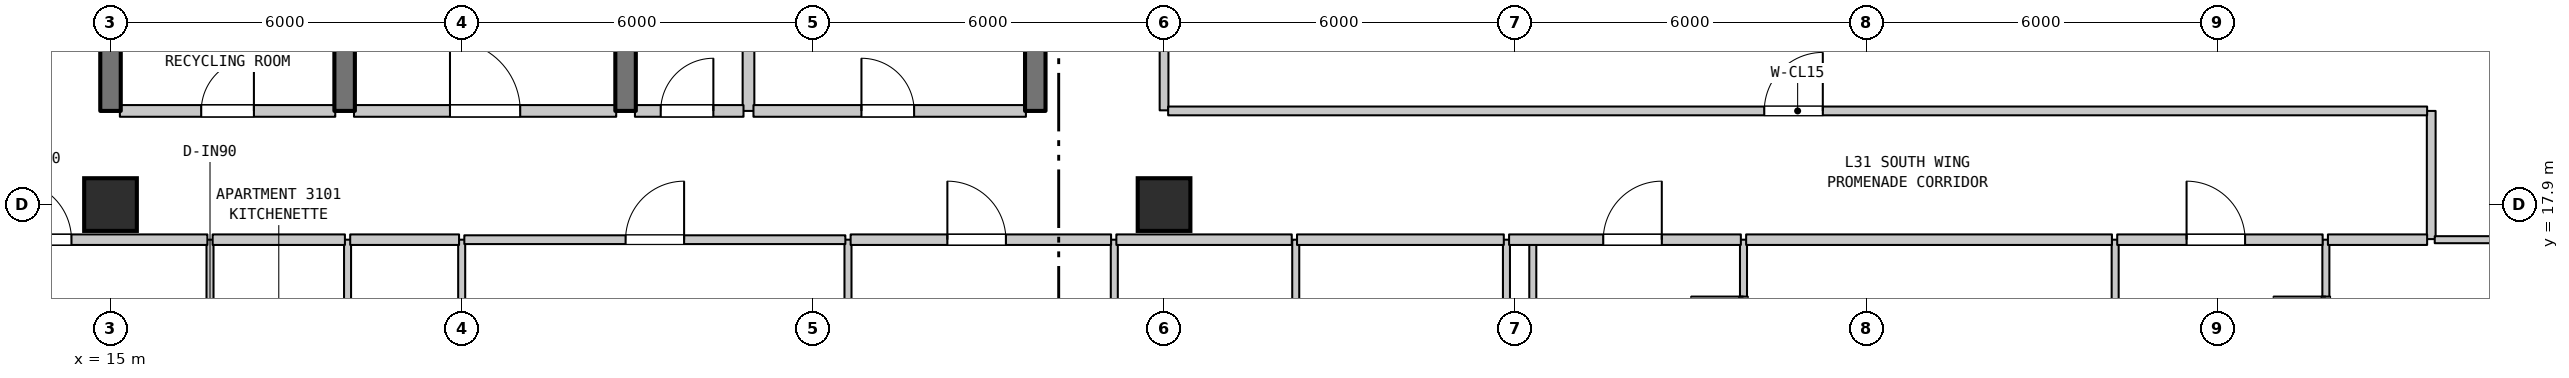
"""IFC4 building model, lengths in metres.
Left out: names, types, materials, properties, quantities, classifications, styles, units other than length and angle.
Written with IfcOpenShell. Run it as: python <this file> out.ifc"""

import sys

from ifc_helpers import new_model, si_unit, direction, frame, frame_2d, origin, origin_2d, place, context, subcontext, project, spatial, rectangle, extrude, element, fill, save


model = new_model("IFC4")
c1 = context("Model", 3, precision=1e-05, world=origin(), true_north=direction((0.0, 1.0)))
c2 = subcontext(c1, "Body", "Model", "MODEL_VIEW")
j1 = project(units=[si_unit("LENGTHUNIT", "METRE"), si_unit("PLANEANGLEUNIT", "RADIAN")], contexts=[c1])
p1 = place(None, origin())
s1 = spatial("IfcSite", under=j1, at=p1, CompositionType="ELEMENT")
p2 = place(p1, origin())
s2 = spatial("IfcBuilding", under=s1, at=p2, CompositionType="ELEMENT")
p3 = place(p2, frame((0.0, 0.0, 129.8)))
s3 = spatial("IfcBuildingStorey", under=s2, at=p3, CompositionType="ELEMENT", Elevation=129.8)
for number, where, z_axis, x_axis in (
    (1, (15.0, 17.9, 0.0), (0.0, 0.0, 1.0), (1.0, 0.0, 0.0)),
    (2, (33.0, 17.9, 0.0), (0.0, 0.0, 1.0), (1.0, 0.0, 0.0)),
):
    element("IfcColumn", number, at=place(p3, frame(where, z_axis=z_axis, x_axis=x_axis)), inside=s3, PredefinedType="COLUMN", context=c2, shape_type="SweptSolid", body=[
        extrude(rectangle(XDim=0.9, YDim=0.9, at=origin_2d()), origin(), (0.0, 0.0, 1.0), 3.7),
    ])
p4 = place(p3, frame((15.0, 19.5, 0.0), z_axis=(0.0, 0.0, 1.0), x_axis=(0.0, 1.0, 0.0)))
e3 = element("IfcWall", 3, at=p4, inside=s3, PredefinedType="SHEAR", context=c2, shape_type="SweptSolid", body=[
    extrude(rectangle(XDim=3.2, YDim=0.35, at=frame_2d((1.6, 0.0))), origin(), (0.0, 0.0, 1.0), 3.385),
])
p5 = place(p3, frame((16.7, 14.1, 0.0), z_axis=(0.0, 0.0, 1.0), x_axis=(0.0, 1.0, 0.0)))
e4 = element("IfcWall", 4, at=p5, inside=s3, PredefinedType="PARTITIONING", context=c2, shape_type="SweptSolid", body=[
    extrude(rectangle(XDim=3.2, YDim=0.12, at=frame_2d((1.6, 0.0))), origin(), (0.0, 0.0, 1.0), 3.385),
])
p6 = place(p5, frame((1.15, 0.0, 0.0)))
e5 = element("IfcOpeningElement", 5, at=p6, cuts=e4, PredefinedType="OPENING", context=c2, shape_type="SweptSolid", body=[
    extrude(rectangle(XDim=0.9, YDim=2.15, at=frame_2d((0.45, 1.075))), frame((0.0, 0.07, 0.0), z_axis=(0.0, -1.0, 0.0), x_axis=(1.0, 0.0, 0.0)), (0.0, 0.0, 1.0), 0.14),
])
p7 = place(p3, frame((19.0, 19.5, 0.0), z_axis=(0.0, 0.0, 1.0), x_axis=(0.0, 1.0, 0.0)))
e6 = element("IfcWall", 6, at=p7, inside=s3, PredefinedType="SHEAR", context=c2, shape_type="SweptSolid", body=[
    extrude(rectangle(XDim=3.2, YDim=0.35, at=frame_2d((1.6, 0.0))), origin(), (0.0, 0.0, 1.0), 3.385),
])
p8 = place(p3, frame((19.05, 14.1, 0.0), z_axis=(0.0, 0.0, 1.0), x_axis=(0.0, 1.0, 0.0)))
e7 = element("IfcWall", 7, at=p8, inside=s3, PredefinedType="PARTITIONING", context=c2, shape_type="SweptSolid", body=[
    extrude(rectangle(XDim=3.2, YDim=0.12, at=frame_2d((1.6, 0.0))), origin(), (0.0, 0.0, 1.0), 3.385),
])
p9 = place(p3, frame((21.0, 6.71, 0.0), z_axis=(0.0, 0.0, 1.0), x_axis=(0.0, 1.0, 0.0)))
e8 = element("IfcWall", 8, at=p9, inside=s3, PredefinedType="PARTITIONING", context=c2, shape_type="SweptSolid", body=[
    extrude(rectangle(XDim=10.59, YDim=0.12, at=frame_2d((5.295, 0.0))), origin(), (0.0, 0.0, 1.0), 3.385),
])
p10 = place(p3, frame((23.8, 19.5, 0.0), z_axis=(0.0, 0.0, 1.0), x_axis=(0.0, 1.0, 0.0)))
e9 = element("IfcWall", 9, at=p10, inside=s3, PredefinedType="SHEAR", context=c2, shape_type="SweptSolid", body=[
    extrude(rectangle(XDim=3.2, YDim=0.35, at=frame_2d((1.6, 0.0))), origin(), (0.0, 0.0, 1.0), 3.385),
])
p11 = place(p3, frame((25.9, 19.5, 0.0), z_axis=(0.0, 0.0, 1.0), x_axis=(0.0, 1.0, 0.0)))
e10 = element("IfcWall", 10, at=p11, inside=s3, PredefinedType="STANDARD", context=c2, shape_type="SweptSolid", body=[
    extrude(rectangle(XDim=3.2, YDim=0.2, at=frame_2d((1.6, 0.0))), origin(), (0.0, 0.0, 1.0), 3.385),
])
p12 = place(p3, frame((27.6, 0.71, 0.0), z_axis=(0.0, 0.0, 1.0), x_axis=(0.0, 1.0, 0.0)))
e11 = element("IfcWall", 11, at=p12, inside=s3, PredefinedType="PARTITIONING", context=c2, shape_type="SweptSolid", body=[
    extrude(rectangle(XDim=16.59, YDim=0.12, at=frame_2d((8.295, 0.0))), origin(), (0.0, 0.0, 1.0), 3.385),
])
p13 = place(p3, frame((30.8, 19.5, 0.0), z_axis=(0.0, 0.0, 1.0), x_axis=(0.0, 1.0, 0.0)))
e12 = element("IfcWall", 12, at=p13, inside=s3, PredefinedType="SHEAR", context=c2, shape_type="SweptSolid", body=[
    extrude(rectangle(XDim=3.2, YDim=0.35, at=frame_2d((1.6, 0.0))), origin(), (0.0, 0.0, 1.0), 3.385),
])
p14 = place(p3, frame((32.15, 11.15, 0.0), z_axis=(0.0, 0.0, 1.0), x_axis=(0.0, 1.0, 0.0)))
e13 = element("IfcWall", 13, at=p14, inside=s3, PredefinedType="PARTITIONING", context=c2, shape_type="SweptSolid", body=[
    extrude(rectangle(XDim=6.15, YDim=0.12, at=frame_2d((3.075, 0.0))), origin(), (0.0, 0.0, 1.0), 3.385),
])
p15 = place(p3, frame((33.0, 19.51, 0.0), z_axis=(0.0, 0.0, 1.0), x_axis=(0.0, 1.0, 0.0)))
e14 = element("IfcWall", 14, at=p15, inside=s3, PredefinedType="STANDARD", context=c2, shape_type="SweptSolid", body=[
    extrude(rectangle(XDim=5.35, YDim=0.15, at=frame_2d((2.675, 0.0))), origin(), (0.0, 0.0, 1.0), 2.935),
])
p16 = place(p15, frame((1.534, 0.0, 0.0)))
e15 = element("IfcOpeningElement", 15, at=p16, cuts=e14, PredefinedType="OPENING", context=c2, shape_type="SweptSolid", body=[
    extrude(rectangle(XDim=1.0, YDim=2.15, at=frame_2d((0.5, 1.075))), frame((0.0, 0.085, 0.0), z_axis=(0.0, -1.0, 0.0), x_axis=(1.0, 0.0, 0.0)), (0.0, 0.0, 1.0), 0.17),
])
for number, where, z_axis, x_axis in (
    (16, (35.25, 11.15, 0.0), (0.0, 0.0, 1.0), (0.0, 1.0, 0.0)),
    (17, (38.85, 11.15, 0.0), (0.0, 0.0, 1.0), (0.0, 1.0, 0.0)),
):
    element("IfcWall", number, at=place(p3, frame(where, z_axis=z_axis, x_axis=x_axis)), inside=s3, PredefinedType="PARTITIONING", context=c2, shape_type="SweptSolid", body=[
        extrude(rectangle(XDim=6.15, YDim=0.12, at=frame_2d((3.075, 0.0))), origin(), (0.0, 0.0, 1.0), 3.385),
    ])
p17 = place(p3, frame((39.3, 0.71, 0.0), z_axis=(0.0, 0.0, 1.0), x_axis=(0.0, 1.0, 0.0)))
e18 = element("IfcWall", 18, at=p17, inside=s3, PredefinedType="PARTITIONING", context=c2, shape_type="SweptSolid", body=[
    extrude(rectangle(XDim=16.59, YDim=0.12, at=frame_2d((8.295, 0.0))), origin(), (0.0, 0.0, 1.0), 3.385),
])
p18 = place(p3, frame((42.9, 14.6, 0.0), z_axis=(0.0, 0.0, 1.0), x_axis=(0.0, 1.0, 0.0)))
e19 = element("IfcWall", 19, at=p18, inside=s3, PredefinedType="PARTITIONING", context=c2, shape_type="SweptSolid", body=[
    extrude(rectangle(XDim=2.7, YDim=0.12, at=frame_2d((1.35, 0.0))), origin(), (0.0, 0.0, 1.0), 3.385),
])
p19 = place(p18, frame((0.828, 0.0, 0.0)))
e20 = element("IfcOpeningElement", 20, at=p19, cuts=e19, PredefinedType="OPENING", context=c2, shape_type="SweptSolid", body=[
    extrude(rectangle(XDim=0.9, YDim=2.1, at=frame_2d((0.45, 1.05))), frame((0.0, 0.07, 0.0), z_axis=(0.0, -1.0, 0.0), x_axis=(1.0, 0.0, 0.0)), (0.0, 0.0, 1.0), 0.14),
])
p20 = place(p3, frame((49.25, 14.6, 0.0), z_axis=(0.0, 0.0, 1.0), x_axis=(0.0, 1.0, 0.0)))
e21 = element("IfcWall", 21, at=p20, inside=s3, PredefinedType="PARTITIONING", context=c2, shape_type="SweptSolid", body=[
    extrude(rectangle(XDim=2.7, YDim=0.12, at=frame_2d((1.35, 0.0))), origin(), (0.0, 0.0, 1.0), 3.385),
])
p21 = place(p3, frame((52.85, 14.6, 0.0), z_axis=(0.0, 0.0, 1.0), x_axis=(0.0, 1.0, 0.0)))
e22 = element("IfcWall", 22, at=p21, inside=s3, PredefinedType="PARTITIONING", context=c2, shape_type="SweptSolid", body=[
    extrude(rectangle(XDim=2.7, YDim=0.12, at=frame_2d((1.35, 0.0))), origin(), (0.0, 0.0, 1.0), 3.385),
])
p22 = place(p21, frame((0.828, 0.0, 0.0)))
e23 = element("IfcOpeningElement", 23, at=p22, cuts=e22, PredefinedType="OPENING", context=c2, shape_type="SweptSolid", body=[
    extrude(rectangle(XDim=0.9, YDim=2.1, at=frame_2d((0.45, 1.05))), frame((0.0, 0.07, 0.0), z_axis=(0.0, -1.0, 0.0), x_axis=(1.0, 0.0, 0.0)), (0.0, 0.0, 1.0), 0.14),
])
p23 = place(p3, frame((54.65, 17.31, 0.0), z_axis=(0.0, 0.0, 1.0), x_axis=(0.0, 1.0, 0.0)))
e24 = element("IfcWall", 24, at=p23, inside=s3, PredefinedType="STANDARD", context=c2, shape_type="SweptSolid", body=[
    extrude(rectangle(XDim=2.19, YDim=0.15, at=frame_2d((1.095, 0.0))), origin(), (0.0, 0.0, 1.0), 3.385),
])
p24 = place(p3, frame((12.875, 17.3, 0.0), z_axis=(0.0, 0.0, 1.0), x_axis=(1.0, 0.0, 0.0)))
e25 = element("IfcWall", 25, at=p24, inside=s3, PredefinedType="STANDARD", context=c2, shape_type="SweptSolid", body=[
    extrude(rectangle(XDim=3.78, YDim=0.18, at=frame_2d((1.89, 0.0))), origin(), (0.0, 0.0, 1.0), 3.385),
])
p25 = place(p24, frame((0.458, 0.0, 0.0)))
e26 = element("IfcOpeningElement", 26, at=p25, cuts=e25, PredefinedType="OPENING", context=c2, shape_type="SweptSolid", body=[
    extrude(rectangle(XDim=1.0, YDim=2.15, at=frame_2d((0.5, 1.075))), frame((0.0, 0.1, 0.0), z_axis=(0.0, -1.0, 0.0), x_axis=(1.0, 0.0, 0.0)), (0.0, 0.0, 1.0), 0.2),
])
p26 = place(p3, frame((16.745, 17.3, 0.0), z_axis=(0.0, 0.0, 1.0), x_axis=(1.0, 0.0, 0.0)))
e27 = element("IfcWall", 27, at=p26, inside=s3, PredefinedType="STANDARD", context=c2, shape_type="SweptSolid", body=[
    extrude(rectangle(XDim=2.26, YDim=0.18, at=frame_2d((1.13, 0.0))), origin(), (0.0, 0.0, 1.0), 3.385),
])
p27 = place(p3, frame((19.095, 17.3, 0.0), z_axis=(0.0, 0.0, 1.0), x_axis=(1.0, 0.0, 0.0)))
e28 = element("IfcWall", 28, at=p27, inside=s3, PredefinedType="STANDARD", context=c2, shape_type="SweptSolid", body=[
    extrude(rectangle(XDim=1.86, YDim=0.18, at=frame_2d((0.93, 0.0))), origin(), (0.0, 0.0, 1.0), 3.385),
])
p28 = place(p3, frame((21.045, 17.3, 0.0), z_axis=(0.0, 0.0, 1.0), x_axis=(1.0, 0.0, 0.0)))
e29 = element("IfcWall", 29, at=p28, inside=s3, PredefinedType="STANDARD", context=c2, shape_type="SweptSolid", body=[
    extrude(rectangle(XDim=6.51, YDim=0.15, at=frame_2d((3.255, 0.0))), origin(), (0.0, 0.0, 1.0), 3.385),
])
p29 = place(p28, frame((2.755, 0.0, 0.0)))
e30 = element("IfcOpeningElement", 30, at=p29, cuts=e29, PredefinedType="OPENING", context=c2, shape_type="SweptSolid", body=[
    extrude(rectangle(XDim=1.0, YDim=2.15, at=frame_2d((0.5, 1.075))), frame((0.0, 0.085, 0.0), z_axis=(0.0, -1.0, 0.0), x_axis=(1.0, 0.0, 0.0)), (0.0, 0.0, 1.0), 0.17),
])
p30 = place(p3, frame((27.645, 17.3, 0.0), z_axis=(0.0, 0.0, 1.0), x_axis=(1.0, 0.0, 0.0)))
e31 = element("IfcWall", 31, at=p30, inside=s3, PredefinedType="STANDARD", context=c2, shape_type="SweptSolid", body=[
    extrude(rectangle(XDim=4.45, YDim=0.18, at=frame_2d((2.225, 0.0))), origin(), (0.0, 0.0, 1.0), 3.385),
])
p31 = place(p30, frame((1.653, 0.0, 0.0)))
e32 = element("IfcOpeningElement", 32, at=p31, cuts=e31, PredefinedType="OPENING", context=c2, shape_type="SweptSolid", body=[
    extrude(rectangle(XDim=1.0, YDim=2.15, at=frame_2d((0.5, 1.075))), frame((0.0, 0.1, 0.0), z_axis=(0.0, -1.0, 0.0), x_axis=(1.0, 0.0, 0.0)), (0.0, 0.0, 1.0), 0.2),
])
p32 = place(p3, frame((32.185, 17.3, 0.0), z_axis=(0.0, 0.0, 1.0), x_axis=(1.0, 0.0, 0.0)))
e33 = element("IfcWall", 33, at=p32, inside=s3, PredefinedType="STANDARD", context=c2, shape_type="SweptSolid", body=[
    extrude(rectangle(XDim=2.997, YDim=0.18, at=frame_2d((1.499, 0.0))), origin(), (0.0, 0.0, 1.0), 3.385),
])
p33 = place(p3, frame((35.272, 17.3, 0.0), z_axis=(0.0, 0.0, 1.0), x_axis=(1.0, 0.0, 0.0)))
e34 = element("IfcWall", 34, at=p33, inside=s3, PredefinedType="STANDARD", context=c2, shape_type="SweptSolid", body=[
    extrude(rectangle(XDim=3.533, YDim=0.18, at=frame_2d((1.767, 0.0))), origin(), (0.0, 0.0, 1.0), 3.385),
])
p34 = place(p3, frame((38.895, 17.3, 0.0), z_axis=(0.0, 0.0, 1.0), x_axis=(1.0, 0.0, 0.0)))
e35 = element("IfcWall", 35, at=p34, inside=s3, PredefinedType="STANDARD", context=c2, shape_type="SweptSolid", body=[
    extrude(rectangle(XDim=3.96, YDim=0.18, at=frame_2d((1.98, 0.0))), origin(), (0.0, 0.0, 1.0), 3.385),
])
p35 = place(p34, frame((1.609, 0.0, 0.0)))
e36 = element("IfcOpeningElement", 36, at=p35, cuts=e35, PredefinedType="OPENING", context=c2, shape_type="SweptSolid", body=[
    extrude(rectangle(XDim=1.0, YDim=2.15, at=frame_2d((0.5, 1.075))), frame((0.0, 0.1, 0.0), z_axis=(0.0, -1.0, 0.0), x_axis=(1.0, 0.0, 0.0)), (0.0, 0.0, 1.0), 0.2),
])
p36 = place(p3, frame((42.945, 17.3, 0.0), z_axis=(0.0, 0.0, 1.0), x_axis=(1.0, 0.0, 0.0)))
e37 = element("IfcWall", 37, at=p36, inside=s3, PredefinedType="STANDARD", context=c2, shape_type="SweptSolid", body=[
    extrude(rectangle(XDim=6.25, YDim=0.18, at=frame_2d((3.125, 0.0))), origin(), (0.0, 0.0, 1.0), 3.385),
])
p37 = place(p3, frame((49.285, 17.3, 0.0), z_axis=(0.0, 0.0, 1.0), x_axis=(1.0, 0.0, 0.0)))
e38 = element("IfcWall", 38, at=p37, inside=s3, PredefinedType="STANDARD", context=c2, shape_type="SweptSolid", body=[
    extrude(rectangle(XDim=3.51, YDim=0.18, at=frame_2d((1.755, 0.0))), origin(), (0.0, 0.0, 1.0), 3.385),
])
p38 = place(p37, frame((1.185, 0.0, 0.0)))
e39 = element("IfcOpeningElement", 39, at=p38, cuts=e38, PredefinedType="OPENING", context=c2, shape_type="SweptSolid", body=[
    extrude(rectangle(XDim=1.0, YDim=2.15, at=frame_2d((0.5, 1.075))), frame((0.0, 0.1, 0.0), z_axis=(0.0, -1.0, 0.0), x_axis=(1.0, 0.0, 0.0)), (0.0, 0.0, 1.0), 0.2),
])
p39 = place(p3, frame((52.885, 17.3, 0.0), z_axis=(0.0, 0.0, 1.0), x_axis=(1.0, 0.0, 0.0)))
e40 = element("IfcWall", 40, at=p39, inside=s3, PredefinedType="STANDARD", context=c2, shape_type="SweptSolid", body=[
    extrude(rectangle(XDim=1.695, YDim=0.18, at=frame_2d((0.848, 0.0))), origin(), (0.0, 0.0, 1.0), 3.385),
])
p40 = place(p3, frame((54.71, 17.3, 0.0), z_axis=(0.0, 0.0, 1.0), x_axis=(1.0, 0.0, 0.0)))
e41 = element("IfcWall", 41, at=p40, inside=s3, PredefinedType="PARTITIONING", context=c2, shape_type="SweptSolid", body=[
    extrude(rectangle(XDim=2.28, YDim=0.12, at=frame_2d((1.14, 0.0))), origin(), (0.0, 0.0, 1.0), 3.385),
])
p41 = place(p3, frame((15.16, 19.5, 0.0), z_axis=(0.0, 0.0, 1.0), x_axis=(1.0, 0.0, 0.0)))
e42 = element("IfcWall", 42, at=p41, inside=s3, PredefinedType="STANDARD", context=c2, shape_type="SweptSolid", body=[
    extrude(rectangle(XDim=3.68, YDim=0.2, at=frame_2d((1.84, 0.0))), origin(), (0.0, 0.0, 1.0), 3.385),
])
p42 = place(p41, frame((1.39, 0.0, 0.0)))
e43 = element("IfcOpeningElement", 43, at=p42, cuts=e42, PredefinedType="OPENING", context=c2, shape_type="SweptSolid", body=[
    extrude(rectangle(XDim=0.9, YDim=2.15, at=frame_2d((0.45, 1.075))), frame((0.0, 0.11, 0.0), z_axis=(0.0, -1.0, 0.0), x_axis=(1.0, 0.0, 0.0)), (0.0, 0.0, 1.0), 0.22),
])
p43 = place(p3, frame((19.16, 19.5, 0.0), z_axis=(0.0, 0.0, 1.0), x_axis=(1.0, 0.0, 0.0)))
e44 = element("IfcWall", 44, at=p43, inside=s3, PredefinedType="STANDARD", context=c2, shape_type="SweptSolid", body=[
    extrude(rectangle(XDim=4.48, YDim=0.2, at=frame_2d((2.24, 0.0))), origin(), (0.0, 0.0, 1.0), 3.385),
])
p44 = place(p43, frame((1.64, 0.0, 0.0)))
e45 = element("IfcOpeningElement", 45, at=p44, cuts=e44, PredefinedType="OPENING", context=c2, shape_type="SweptSolid", body=[
    extrude(rectangle(XDim=1.2, YDim=2.2, at=frame_2d((0.6, 1.1))), frame((0.0, 0.11, 0.0), z_axis=(0.0, -1.0, 0.0), x_axis=(1.0, 0.0, 0.0)), (0.0, 0.0, 1.0), 0.22),
])
p45 = place(p3, frame((23.96, 19.5, 0.0), z_axis=(0.0, 0.0, 1.0), x_axis=(1.0, 0.0, 0.0)))
e46 = element("IfcWall", 46, at=p45, inside=s3, PredefinedType="STANDARD", context=c2, shape_type="SweptSolid", body=[
    extrude(rectangle(XDim=1.855, YDim=0.2, at=frame_2d((0.927, 0.0))), origin(), (0.0, 0.0, 1.0), 3.385),
])
p46 = place(p45, frame((0.44, 0.0, 0.0)))
e47 = element("IfcOpeningElement", 47, at=p46, cuts=e46, PredefinedType="OPENING", context=c2, shape_type="SweptSolid", body=[
    extrude(rectangle(XDim=0.9, YDim=2.15, at=frame_2d((0.45, 1.075))), frame((0.0, 0.11, 0.0), z_axis=(0.0, -1.0, 0.0), x_axis=(1.0, 0.0, 0.0)), (0.0, 0.0, 1.0), 0.22),
])
p47 = place(p3, frame((25.985, 19.5, 0.0), z_axis=(0.0, 0.0, 1.0), x_axis=(1.0, 0.0, 0.0)))
e48 = element("IfcWall", 48, at=p47, inside=s3, PredefinedType="STANDARD", context=c2, shape_type="SweptSolid", body=[
    extrude(rectangle(XDim=4.655, YDim=0.2, at=frame_2d((2.327, 0.0))), origin(), (0.0, 0.0, 1.0), 3.385),
])
p48 = place(p47, frame((1.845, 0.0, 0.0)))
e49 = element("IfcOpeningElement", 49, at=p48, cuts=e48, PredefinedType="OPENING", context=c2, shape_type="SweptSolid", body=[
    extrude(rectangle(XDim=0.9, YDim=2.15, at=frame_2d((0.45, 1.075))), frame((0.0, 0.11, 0.0), z_axis=(0.0, -1.0, 0.0), x_axis=(1.0, 0.0, 0.0)), (0.0, 0.0, 1.0), 0.22),
])
p49 = place(p3, frame((33.07, 19.5, 0.0), z_axis=(0.0, 0.0, 1.0), x_axis=(1.0, 0.0, 0.0)))
e50 = element("IfcWall", 50, at=p49, inside=s3, PredefinedType="STANDARD", context=c2, shape_type="SweptSolid", body=[
    extrude(rectangle(XDim=21.51, YDim=0.15, at=frame_2d((10.755, 0.0))), origin(), (0.0, 0.0, 1.0), 3.385),
])
p50 = place(p49, frame((10.185, 0.0, 0.0)))
e51 = element("IfcOpeningElement", 51, at=p50, cuts=e50, PredefinedType="OPENING", context=c2, shape_type="SweptSolid", body=[
    extrude(rectangle(XDim=1.0, YDim=2.15, at=frame_2d((0.5, 1.075))), frame((0.0, 0.085, 0.0), z_axis=(0.0, -1.0, 0.0), x_axis=(1.0, 0.0, 0.0)), (0.0, 0.0, 1.0), 0.17),
])
p51 = place(p19, origin())
e52 = element("IfcDoor", 52, at=p51, inside=s3, OperationType="SINGLE_SWING_RIGHT", PredefinedType="DOOR", context=c2, shape_type="SweptSolid", body=[
    extrude(rectangle(XDim=0.9, YDim=2.1, at=frame_2d((0.45, 1.05))), frame((0.0, 0.025, 0.0), z_axis=(0.0, -1.0, 0.0), x_axis=(1.0, 0.0, 0.0)), (0.0, 0.0, 1.0), 0.05),
])
fill(e20, e52)
p52 = place(p22, origin())
e53 = element("IfcDoor", 53, at=p52, inside=s3, OperationType="SINGLE_SWING_RIGHT", PredefinedType="DOOR", context=c2, shape_type="SweptSolid", body=[
    extrude(rectangle(XDim=0.9, YDim=2.1, at=frame_2d((0.45, 1.05))), frame((0.0, 0.025, 0.0), z_axis=(0.0, -1.0, 0.0), x_axis=(1.0, 0.0, 0.0)), (0.0, 0.0, 1.0), 0.05),
])
fill(e23, e53)
p53 = place(p25, origin())
e54 = element("IfcDoor", 54, at=p53, inside=s3, OperationType="SINGLE_SWING_LEFT", PredefinedType="DOOR", context=c2, shape_type="SweptSolid", body=[
    extrude(rectangle(XDim=1.0, YDim=2.15, at=frame_2d((0.5, 1.075))), frame((0.0, 0.025, 0.0), z_axis=(0.0, -1.0, 0.0), x_axis=(1.0, 0.0, 0.0)), (0.0, 0.0, 1.0), 0.05),
])
fill(e26, e54)
p54 = place(p29, origin())
e55 = element("IfcDoor", 55, at=p54, inside=s3, OperationType="SINGLE_SWING_RIGHT", PredefinedType="DOOR", context=c2, shape_type="SweptSolid", body=[
    extrude(rectangle(XDim=1.0, YDim=2.15, at=frame_2d((0.5, 1.075))), frame((0.0, 0.025, 0.0), z_axis=(0.0, -1.0, 0.0), x_axis=(1.0, 0.0, 0.0)), (0.0, 0.0, 1.0), 0.05),
])
fill(e30, e55)
p55 = place(p31, origin())
e56 = element("IfcDoor", 56, at=p55, inside=s3, OperationType="SINGLE_SWING_LEFT", PredefinedType="DOOR", context=c2, shape_type="SweptSolid", body=[
    extrude(rectangle(XDim=1.0, YDim=2.15, at=frame_2d((0.5, 1.075))), frame((0.0, 0.025, 0.0), z_axis=(0.0, -1.0, 0.0), x_axis=(1.0, 0.0, 0.0)), (0.0, 0.0, 1.0), 0.05),
])
fill(e32, e56)
p56 = place(p35, origin())
e57 = element("IfcDoor", 57, at=p56, inside=s3, OperationType="SINGLE_SWING_RIGHT", PredefinedType="DOOR", context=c2, shape_type="SweptSolid", body=[
    extrude(rectangle(XDim=1.0, YDim=2.15, at=frame_2d((0.5, 1.075))), frame((0.0, 0.025, 0.0), z_axis=(0.0, -1.0, 0.0), x_axis=(1.0, 0.0, 0.0)), (0.0, 0.0, 1.0), 0.05),
])
fill(e36, e57)
p57 = place(p38, origin())
e58 = element("IfcDoor", 58, at=p57, inside=s3, OperationType="SINGLE_SWING_LEFT", PredefinedType="DOOR", context=c2, shape_type="SweptSolid", body=[
    extrude(rectangle(XDim=1.0, YDim=2.15, at=frame_2d((0.5, 1.075))), frame((0.0, 0.025, 0.0), z_axis=(0.0, -1.0, 0.0), x_axis=(1.0, 0.0, 0.0)), (0.0, 0.0, 1.0), 0.05),
])
fill(e39, e58)
p58 = place(p42, origin())
e59 = element("IfcDoor", 59, at=p58, inside=s3, OperationType="SINGLE_SWING_RIGHT", PredefinedType="DOOR", context=c2, shape_type="SweptSolid", body=[
    extrude(rectangle(XDim=0.9, YDim=2.15, at=frame_2d((0.45, 1.075))), frame((0.0, 0.025, 0.0), z_axis=(0.0, -1.0, 0.0), x_axis=(1.0, 0.0, 0.0)), (0.0, 0.0, 1.0), 0.05),
])
fill(e43, e59)
p59 = place(p44, origin())
e60 = element("IfcDoor", 60, at=p59, inside=s3, OperationType="SINGLE_SWING_LEFT", PredefinedType="DOOR", context=c2, shape_type="SweptSolid", body=[
    extrude(rectangle(XDim=1.2, YDim=2.2, at=frame_2d((0.6, 1.1))), frame((0.0, 0.025, 0.0), z_axis=(0.0, -1.0, 0.0), x_axis=(1.0, 0.0, 0.0)), (0.0, 0.0, 1.0), 0.05),
])
fill(e45, e60)
p60 = place(p46, origin())
e61 = element("IfcDoor", 61, at=p60, inside=s3, OperationType="SINGLE_SWING_RIGHT", PredefinedType="DOOR", context=c2, shape_type="SweptSolid", body=[
    extrude(rectangle(XDim=0.9, YDim=2.15, at=frame_2d((0.45, 1.075))), frame((0.0, 0.025, 0.0), z_axis=(0.0, -1.0, 0.0), x_axis=(1.0, 0.0, 0.0)), (0.0, 0.0, 1.0), 0.05),
])
fill(e47, e61)
p61 = place(p48, origin())
e62 = element("IfcDoor", 62, at=p61, inside=s3, OperationType="SINGLE_SWING_LEFT", PredefinedType="DOOR", context=c2, shape_type="SweptSolid", body=[
    extrude(rectangle(XDim=0.9, YDim=2.15, at=frame_2d((0.45, 1.075))), frame((0.0, 0.025, 0.0), z_axis=(0.0, -1.0, 0.0), x_axis=(1.0, 0.0, 0.0)), (0.0, 0.0, 1.0), 0.05),
])
fill(e49, e62)
p62 = place(p50, origin())
e63 = element("IfcDoor", 63, at=p62, inside=s3, OperationType="SINGLE_SWING_RIGHT", PredefinedType="DOOR", context=c2, shape_type="SweptSolid", body=[
    extrude(rectangle(XDim=1.0, YDim=2.15, at=frame_2d((0.5, 1.075))), frame((0.0, 0.025, 0.0), z_axis=(0.0, -1.0, 0.0), x_axis=(1.0, 0.0, 0.0)), (0.0, 0.0, 1.0), 0.05),
])
fill(e51, e63)
save(model, sys.argv[1])
